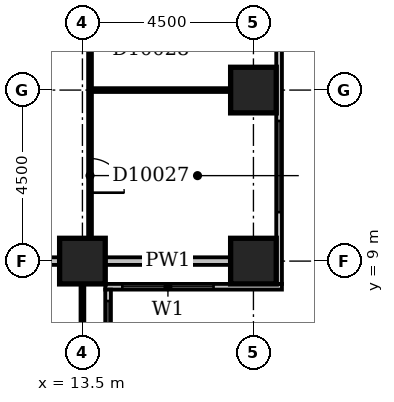
"""IFC4 building model, lengths in metres.
Left out: names, types, materials, properties, quantities, classifications, styles, units other than length and angle.
Written with IfcOpenShell. Run it as: python <this file> out.ifc"""

import sys

from ifc_helpers import new_model, si_unit, direction, frame, frame_2d, origin, origin_2d, place, context, subcontext, project, spatial, rectangle, extrude, element, fill, save


model = new_model("IFC4")
c1 = context("Model", 3, precision=1e-05, world=origin(), true_north=direction((0.0, 1.0)))
c2 = subcontext(c1, "Body", "Model", "MODEL_VIEW")
j1 = project(units=[si_unit("LENGTHUNIT", "METRE"), si_unit("PLANEANGLEUNIT", "RADIAN")], contexts=[c1])
p1 = place(None, origin())
s1 = spatial("IfcSite", under=j1, at=p1, CompositionType="ELEMENT")
p2 = place(p1, origin())
s2 = spatial("IfcBuilding", under=s1, at=p2, CompositionType="ELEMENT")
p3 = place(p2, frame((0.0, 0.0, 47.0)))
s3 = spatial("IfcBuildingStorey", under=s2, at=p3, CompositionType="ELEMENT", Elevation=47.0)
for number, where, z_axis, x_axis in (
    (1, (13.5, 9.0, -0.3), (0.0, 0.0, 1.0), (1.0, 0.0, 0.0)),
    (2, (18.0, 9.0, -0.3), (0.0, 0.0, 1.0), (1.0, 0.0, 0.0)),
    (3, (18.0, 13.5, -0.3), (0.0, 0.0, 1.0), (1.0, 0.0, 0.0)),
):
    element("IfcColumn", number, at=place(p3, frame(where, z_axis=z_axis, x_axis=x_axis)), inside=s3, PredefinedType="COLUMN", context=c2, shape_type="SweptSolid", body=[
        extrude(rectangle(XDim=1.2, YDim=1.2, at=origin_2d()), origin(), (0.0, 0.0, 1.0), 3.6),
    ])
p4 = place(p3, frame((14.175, 3.9, 0.0), z_axis=(0.0, 0.0, 1.0), x_axis=(0.0, 1.0, 0.0)))
e4 = element("IfcWall", 4, at=p4, inside=s3, PredefinedType="STANDARD", context=c2, shape_type="SweptSolid", body=[
    extrude(rectangle(XDim=4.35, YDim=0.15, at=frame_2d((2.175, 0.0))), origin(), (0.0, 0.0, 1.0), 2.7),
])
p5 = place(p4, frame((1.65, 0.0, 0.6)))
e5 = element("IfcOpeningElement", 5, at=p5, cuts=e4, PredefinedType="OPENING", context=c2, shape_type="SweptSolid", body=[
    extrude(rectangle(XDim=2.4, YDim=1.8, at=frame_2d((1.2, 0.9))), frame((0.0, 0.087, 0.0), z_axis=(0.0, -1.0, 0.0), x_axis=(1.0, 0.0, 0.0)), (0.0, 0.0, 1.0), 0.174),
])
p6 = place(p3, frame((14.1, 8.325, 0.0), z_axis=(0.0, 0.0, 1.0), x_axis=(1.0, 0.0, 0.0)))
e6 = element("IfcWall", 6, at=p6, inside=s3, PredefinedType="STANDARD", context=c2, shape_type="SweptSolid", body=[
    extrude(rectangle(XDim=4.65, YDim=0.15, at=frame_2d((2.325, 0.0))), origin(), (0.0, 0.0, 1.0), 2.7),
])
p7 = place(p6, frame((0.45, 0.0, 0.6)))
e7 = element("IfcOpeningElement", 7, at=p7, cuts=e6, PredefinedType="OPENING", context=c2, shape_type="SweptSolid", body=[
    extrude(rectangle(XDim=2.4, YDim=1.8, at=frame_2d((1.2, 0.9))), frame((0.0, 0.087, 0.0), z_axis=(0.0, -1.0, 0.0), x_axis=(1.0, 0.0, 0.0)), (0.0, 0.0, 1.0), 0.174),
])
p8 = place(p3, frame((18.675, 8.4, 0.0), z_axis=(0.0, 0.0, 1.0), x_axis=(0.0, 1.0, 0.0)))
e8 = element("IfcWall", 8, at=p8, inside=s3, PredefinedType="STANDARD", context=c2, shape_type="SweptSolid", body=[
    extrude(rectangle(XDim=8.85, YDim=0.15, at=frame_2d((4.425, 0.0))), origin(), (0.0, 0.0, 1.0), 2.7),
])
p9 = place(p8, frame((1.888, 0.0, 0.6)))
e9 = element("IfcOpeningElement", 9, at=p9, cuts=e8, PredefinedType="OPENING", context=c2, shape_type="SweptSolid", body=[
    extrude(rectangle(XDim=2.4, YDim=1.8, at=frame_2d((1.2, 0.9))), frame((0.0, 0.087, 0.0), z_axis=(0.0, -1.0, 0.0), x_axis=(1.0, 0.0, 0.0)), (0.0, 0.0, 1.0), 0.174),
])
p10 = place(p8, frame((6.15, 0.0, 0.6)))
e10 = element("IfcOpeningElement", 10, at=p10, cuts=e8, PredefinedType="OPENING", context=c2, shape_type="SweptSolid", body=[
    extrude(rectangle(XDim=2.4, YDim=1.8, at=frame_2d((1.2, 0.9))), frame((0.0, 0.087, 0.0), z_axis=(0.0, -1.0, 0.0), x_axis=(1.0, 0.0, 0.0)), (0.0, 0.0, 1.0), 0.174),
])
p11 = place(p3, frame((13.5, 5.1, 0.0), z_axis=(0.0, 0.0, 1.0), x_axis=(0.0, 1.0, 0.0)))
e11 = element("IfcWall", 11, at=p11, inside=s3, PredefinedType="PARTITIONING", context=c2, shape_type="SweptSolid", body=[
    extrude(rectangle(XDim=3.3, YDim=0.1, at=frame_2d((1.65, 0.0))), origin(), (0.0, 0.0, 1.0), 2.7),
])
p12 = place(p3, frame((9.1, 9.0, 0.0), z_axis=(0.0, 0.0, 1.0), x_axis=(1.0, 0.0, 0.0)))
e12 = element("IfcWall", 12, at=p12, inside=s3, PredefinedType="PARTITIONING", context=c2, shape_type="SweptSolid", body=[
    extrude(rectangle(XDim=3.8, YDim=0.2, at=frame_2d((1.9, 0.0))), origin(), (0.0, 0.0, 1.0), 3.3),
])
p13 = place(p3, frame((14.1, 9.0, 0.0), z_axis=(0.0, 0.0, 1.0), x_axis=(1.0, 0.0, 0.0)))
e13 = element("IfcWall", 13, at=p13, inside=s3, PredefinedType="PARTITIONING", context=c2, shape_type="SweptSolid", body=[
    extrude(rectangle(XDim=3.3, YDim=0.2, at=frame_2d((1.65, 0.0))), origin(), (0.0, 0.0, 1.0), 2.7),
])
p14 = place(p3, frame((13.7, 9.6, 0.0), z_axis=(0.0, 0.0, 1.0), x_axis=(0.0, 1.0, 0.0)))
e14 = element("IfcWall", 14, at=p14, inside=s3, PredefinedType="PARTITIONING", context=c2, shape_type="SweptSolid", body=[
    extrude(rectangle(XDim=8.3, YDim=0.1, at=frame_2d((4.15, 0.0))), origin(), (0.0, 0.0, 1.0), 3.3),
])
p15 = place(p14, frame((1.2, 0.0, 0.0)))
e15 = element("IfcOpeningElement", 15, at=p15, cuts=e14, PredefinedType="OPENING", context=c2, shape_type="SweptSolid", body=[
    extrude(rectangle(XDim=0.9, YDim=2.1, at=frame_2d((0.45, 1.05))), frame((0.0, 0.062, 0.0), z_axis=(0.0, -1.0, 0.0), x_axis=(1.0, 0.0, 0.0)), (0.0, 0.0, 1.0), 0.124),
])
p16 = place(p14, frame((5.7, 0.0, 0.0)))
e16 = element("IfcOpeningElement", 16, at=p16, cuts=e14, PredefinedType="OPENING", context=c2, shape_type="SweptSolid", body=[
    extrude(rectangle(XDim=0.9, YDim=2.1, at=frame_2d((0.45, 1.05))), frame((0.0, 0.062, 0.0), z_axis=(0.0, -1.0, 0.0), x_axis=(1.0, 0.0, 0.0)), (0.0, 0.0, 1.0), 0.124),
])
p17 = place(p3, frame((13.75, 13.5, 0.0), z_axis=(0.0, 0.0, 1.0), x_axis=(1.0, 0.0, 0.0)))
e17 = element("IfcWall", 17, at=p17, inside=s3, PredefinedType="PARTITIONING", context=c2, shape_type="SweptSolid", body=[
    extrude(rectangle(XDim=3.65, YDim=0.1, at=frame_2d((1.825, 0.0))), origin(), (0.0, 0.0, 1.0), 3.3),
])
p18 = place(p5, origin())
e18 = element("IfcWindow", 18, at=p18, inside=s3, PartitioningType="SINGLE_PANEL", PredefinedType="WINDOW", context=c2, shape_type="SweptSolid", body=[
    extrude(rectangle(XDim=2.4, YDim=1.8, at=frame_2d((1.2, 0.9))), frame((0.0, 0.03, 0.0), z_axis=(0.0, -1.0, 0.0), x_axis=(1.0, 0.0, 0.0)), (0.0, 0.0, 1.0), 0.06),
])
fill(e5, e18)
p19 = place(p7, origin())
e19 = element("IfcWindow", 19, at=p19, inside=s3, PartitioningType="SINGLE_PANEL", PredefinedType="WINDOW", context=c2, shape_type="SweptSolid", body=[
    extrude(rectangle(XDim=2.4, YDim=1.8, at=frame_2d((1.2, 0.9))), frame((0.0, 0.03, 0.0), z_axis=(0.0, -1.0, 0.0), x_axis=(1.0, 0.0, 0.0)), (0.0, 0.0, 1.0), 0.06),
])
fill(e7, e19)
p20 = place(p9, origin())
e20 = element("IfcWindow", 20, at=p20, inside=s3, PartitioningType="SINGLE_PANEL", PredefinedType="WINDOW", context=c2, shape_type="SweptSolid", body=[
    extrude(rectangle(XDim=2.4, YDim=1.8, at=frame_2d((1.2, 0.9))), frame((0.0, 0.03, 0.0), z_axis=(0.0, -1.0, 0.0), x_axis=(1.0, 0.0, 0.0)), (0.0, 0.0, 1.0), 0.06),
])
fill(e9, e20)
p21 = place(p15, frame((0.9, 0.0, 0.0), z_axis=(0.0, 0.0, 1.0), x_axis=(-1.0, 0.0, 0.0)))
e21 = element("IfcDoor", 21, at=p21, inside=s3, OperationType="SINGLE_SWING_RIGHT", PredefinedType="DOOR", context=c2, shape_type="SweptSolid", body=[
    extrude(rectangle(XDim=0.9, YDim=2.1, at=frame_2d((0.45, 1.05))), frame((0.0, 0.025, 0.0), z_axis=(0.0, -1.0, 0.0), x_axis=(1.0, 0.0, 0.0)), (0.0, 0.0, 1.0), 0.05),
])
fill(e15, e21)
save(model, sys.argv[1])
